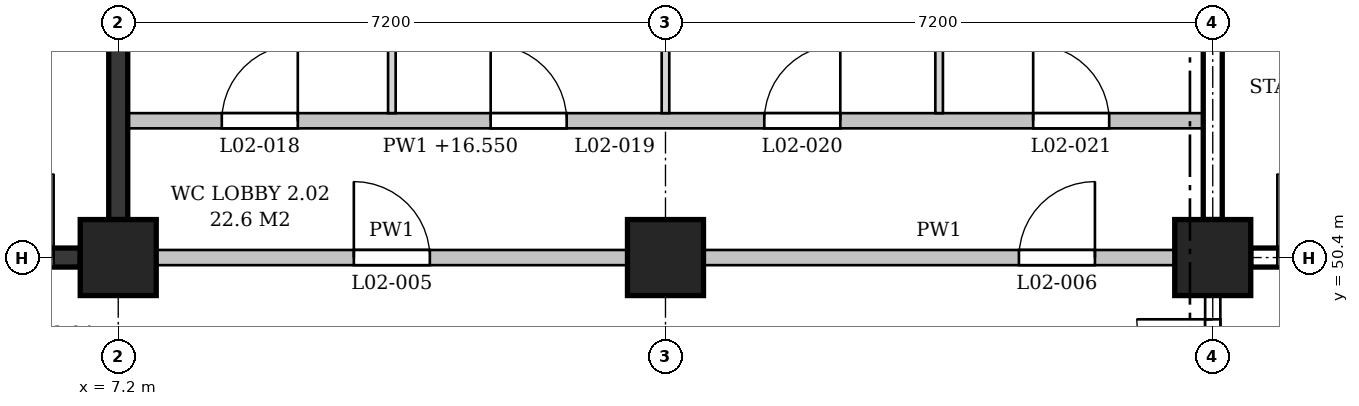
"""IFC4 building model, lengths in metres.
Left out: names, types, materials, properties, quantities, classifications, styles, units other than length and angle.
Written with IfcOpenShell. Run it as: python <this file> out.ifc"""

import sys

from ifc_helpers import new_model, si_unit, direction, frame, frame_2d, origin, origin_2d, place, context, subcontext, project, spatial, polyline, rectangle, outline, extrude, element, fill, save


model = new_model("IFC4")
c1 = context("Model", 3, precision=1e-05, world=origin(), true_north=direction((0.0, 1.0)))
c2 = subcontext(c1, "Body", "Model", "MODEL_VIEW")
j1 = project(units=[si_unit("LENGTHUNIT", "METRE"), si_unit("PLANEANGLEUNIT", "RADIAN")], contexts=[c1])
p1 = place(None, origin())
s1 = spatial("IfcSite", under=j1, at=p1, CompositionType="ELEMENT")
p2 = place(p1, origin())
s2 = spatial("IfcBuilding", under=s1, at=p2, CompositionType="ELEMENT")
p3 = place(p2, frame((0.0, 0.0, 11.4)))
s3 = spatial("IfcBuildingStorey", under=s2, at=p3, CompositionType="ELEMENT", Elevation=11.4)
for number, where, z_axis, x_axis in (
    (1, (7.2, 50.4, 0.0), (0.0, 0.0, 1.0), (1.0, 0.0, 0.0)),
    (2, (14.4, 50.4, 0.0), (0.0, 0.0, 1.0), (1.0, 0.0, 0.0)),
    (3, (21.6, 50.4, 0.0), (0.0, 0.0, 1.0), (1.0, 0.0, 0.0)),
):
    element("IfcColumn", number, at=place(p3, frame(where, z_axis=z_axis, x_axis=x_axis)), inside=s3, PredefinedType="COLUMN", context=c2, shape_type="SweptSolid", body=[
        extrude(rectangle(XDim=1.0, YDim=1.0, at=origin_2d()), origin(), (0.0, 0.0, 1.0), 5.4),
    ])
p4 = place(p3, frame((0.5, 50.4, 0.0), z_axis=(0.0, 0.0, 1.0), x_axis=(1.0, 0.0, 0.0)))
e4 = element("IfcWall", 4, at=p4, inside=s3, PredefinedType="SHEAR", context=c2, shape_type="SweptSolid", body=[
    extrude(rectangle(XDim=6.2, YDim=0.25, at=frame_2d((3.1, 0.0))), origin(), (0.0, 0.0, 1.0), 4.4),
])
p5 = place(p4, frame((4.75, 0.0, 0.0)))
e5 = element("IfcOpeningElement", 5, at=p5, cuts=e4, PredefinedType="OPENING", context=c2, shape_type="SweptSolid", body=[
    extrude(rectangle(XDim=1.1, YDim=2.1, at=frame_2d((0.55, 1.05))), frame((0.0, 0.135, 0.0), z_axis=(0.0, -1.0, 0.0), x_axis=(1.0, 0.0, 0.0)), (0.0, 0.0, 1.0), 0.27),
])
p6 = place(p3, frame((7.2, 50.9, 0.0), z_axis=(0.0, 0.0, 1.0), x_axis=(0.0, 1.0, 0.0)))
e6 = element("IfcWall", 6, at=p6, inside=s3, PredefinedType="SHEAR", context=c2, shape_type="SweptSolid", body=[
    extrude(rectangle(XDim=6.2, YDim=0.25, at=frame_2d((3.1, 0.0))), origin(), (0.0, 0.0, 1.0), 4.4),
])
p7 = place(p3, frame((22.1, 50.4, 0.0), z_axis=(0.0, 0.0, 1.0), x_axis=(1.0, 0.0, 0.0)))
e7 = element("IfcWall", 7, at=p7, inside=s3, PredefinedType="SHEAR", context=c2, shape_type="SweptSolid", body=[
    extrude(rectangle(XDim=6.2, YDim=0.25, at=frame_2d((3.1, 0.0))), origin(), (0.0, 0.0, 1.0), 4.4),
])
p8 = place(p7, frame((0.35, 0.0, 0.0)))
e8 = element("IfcOpeningElement", 8, at=p8, cuts=e7, PredefinedType="OPENING", context=c2, shape_type="SweptSolid", body=[
    extrude(rectangle(XDim=1.1, YDim=2.1, at=frame_2d((0.55, 1.05))), frame((0.0, 0.135, 0.0), z_axis=(0.0, -1.0, 0.0), x_axis=(1.0, 0.0, 0.0)), (0.0, 0.0, 1.0), 0.27),
])
p9 = place(p3, frame((21.6, 50.9, 0.0), z_axis=(0.0, 0.0, 1.0), x_axis=(0.0, 1.0, 0.0)))
e9 = element("IfcWall", 9, at=p9, inside=s3, PredefinedType="SHEAR", context=c2, shape_type="SweptSolid", body=[
    extrude(rectangle(XDim=6.2, YDim=0.25, at=frame_2d((3.1, 0.0))), origin(), (0.0, 0.0, 1.0), 4.4),
])
p10 = place(p3, frame((7.7, 50.4, 0.0), z_axis=(0.0, 0.0, 1.0), x_axis=(1.0, 0.0, 0.0)))
e10 = element("IfcWall", 10, at=p10, inside=s3, PredefinedType="PARTITIONING", context=c2, shape_type="SweptSolid", body=[
    extrude(rectangle(XDim=6.2, YDim=0.2, at=frame_2d((3.1, 0.0))), origin(), (0.0, 0.0, 1.0), 4.4),
])
p11 = place(p10, frame((2.6, 0.0, 0.0)))
e11 = element("IfcOpeningElement", 11, at=p11, cuts=e10, PredefinedType="OPENING", context=c2, shape_type="SweptSolid", body=[
    extrude(rectangle(XDim=1.0, YDim=2.1, at=frame_2d((0.5, 1.05))), frame((0.0, 0.11, 0.0), z_axis=(0.0, -1.0, 0.0), x_axis=(1.0, 0.0, 0.0)), (0.0, 0.0, 1.0), 0.22),
])
p12 = place(p3, frame((14.9, 50.4, 0.0), z_axis=(0.0, 0.0, 1.0), x_axis=(1.0, 0.0, 0.0)))
e12 = element("IfcWall", 12, at=p12, inside=s3, PredefinedType="PARTITIONING", context=c2, shape_type="SweptSolid", body=[
    extrude(rectangle(XDim=6.2, YDim=0.2, at=frame_2d((3.1, 0.0))), origin(), (0.0, 0.0, 1.0), 4.4),
])
p13 = place(p12, frame((4.15, 0.0, 0.0)))
e13 = element("IfcOpeningElement", 13, at=p13, cuts=e12, PredefinedType="OPENING", context=c2, shape_type="SweptSolid", body=[
    extrude(rectangle(XDim=1.0, YDim=2.1, at=frame_2d((0.5, 1.05))), frame((0.0, 0.11, 0.0), z_axis=(0.0, -1.0, 0.0), x_axis=(1.0, 0.0, 0.0)), (0.0, 0.0, 1.0), 0.22),
])
p14 = place(p3, frame((7.325, 52.2, 0.0), z_axis=(0.0, 0.0, 1.0), x_axis=(1.0, 0.0, 0.0)))
e14 = element("IfcWall", 14, at=p14, inside=s3, PredefinedType="PARTITIONING", context=c2, shape_type="SweptSolid", body=[
    extrude(outline(polyline([(0.0, 0.0), (14.15, 0.0), (14.15, 4.4), (14.025, 4.4), (14.025, 5.15), (7.325, 5.15), (7.325, 4.4), (6.825, 4.4), (6.825, 5.15), (0.125, 5.15), (0.125, 4.4), (0.0, 4.4), (0.0, 0.0)])), frame((0.0, 0.1, 0.0), z_axis=(0.0, -1.0, 0.0), x_axis=(1.0, 0.0, 0.0)), (0.0, 0.0, 1.0), 0.2),
])
p15 = place(p14, frame((1.238, 0.0, 0.0)))
e15 = element("IfcOpeningElement", 15, at=p15, cuts=e14, PredefinedType="OPENING", context=c2, shape_type="SweptSolid", body=[
    extrude(rectangle(XDim=1.0, YDim=2.1, at=frame_2d((0.5, 1.05))), frame((0.0, 0.11, 0.0), z_axis=(0.0, -1.0, 0.0), x_axis=(1.0, 0.0, 0.0)), (0.0, 0.0, 1.0), 0.22),
])
p16 = place(p14, frame((4.775, 0.0, 0.0)))
e16 = element("IfcOpeningElement", 16, at=p16, cuts=e14, PredefinedType="OPENING", context=c2, shape_type="SweptSolid", body=[
    extrude(rectangle(XDim=1.0, YDim=2.1, at=frame_2d((0.5, 1.05))), frame((0.0, 0.11, 0.0), z_axis=(0.0, -1.0, 0.0), x_axis=(1.0, 0.0, 0.0)), (0.0, 0.0, 1.0), 0.22),
])
p17 = place(p14, frame((8.375, 0.0, 0.0)))
e17 = element("IfcOpeningElement", 17, at=p17, cuts=e14, PredefinedType="OPENING", context=c2, shape_type="SweptSolid", body=[
    extrude(rectangle(XDim=1.0, YDim=2.1, at=frame_2d((0.5, 1.05))), frame((0.0, 0.11, 0.0), z_axis=(0.0, -1.0, 0.0), x_axis=(1.0, 0.0, 0.0)), (0.0, 0.0, 1.0), 0.22),
])
p18 = place(p14, frame((11.913, 0.0, 0.0)))
e18 = element("IfcOpeningElement", 18, at=p18, cuts=e14, PredefinedType="OPENING", context=c2, shape_type="SweptSolid", body=[
    extrude(rectangle(XDim=1.0, YDim=2.1, at=frame_2d((0.5, 1.05))), frame((0.0, 0.11, 0.0), z_axis=(0.0, -1.0, 0.0), x_axis=(1.0, 0.0, 0.0)), (0.0, 0.0, 1.0), 0.22),
])
p19 = place(p3, frame((10.8, 52.3, 0.0), z_axis=(0.0, 0.0, 1.0), x_axis=(0.0, 1.0, 0.0)))
e19 = element("IfcWall", 19, at=p19, inside=s3, PredefinedType="PARTITIONING", context=c2, shape_type="SweptSolid", body=[
    extrude(rectangle(XDim=5.15, YDim=0.1, at=frame_2d((2.575, 0.0))), origin(), (0.0, 0.0, 1.0), 4.4),
])
p20 = place(p3, frame((14.4, 52.3, 0.0), z_axis=(0.0, 0.0, 1.0), x_axis=(0.0, 1.0, 0.0)))
e20 = element("IfcWall", 20, at=p20, inside=s3, PredefinedType="PARTITIONING", context=c2, shape_type="SweptSolid", body=[
    extrude(rectangle(XDim=4.8, YDim=0.1, at=frame_2d((2.4, 0.0))), origin(), (0.0, 0.0, 1.0), 4.4),
])
p21 = place(p3, frame((18.0, 52.3, 0.0), z_axis=(0.0, 0.0, 1.0), x_axis=(0.0, 1.0, 0.0)))
e21 = element("IfcWall", 21, at=p21, inside=s3, PredefinedType="PARTITIONING", context=c2, shape_type="SweptSolid", body=[
    extrude(rectangle(XDim=5.15, YDim=0.1, at=frame_2d((2.575, 0.0))), origin(), (0.0, 0.0, 1.0), 4.4),
])
p22 = place(p3, frame((21.6, 47.275, 0.0), z_axis=(0.0, 0.0, 1.0), x_axis=(0.0, 1.0, 0.0)))
e22 = element("IfcWall", 22, at=p22, inside=s3, PredefinedType="PARTITIONING", context=c2, shape_type="SweptSolid", body=[
    extrude(rectangle(XDim=2.625, YDim=0.2, at=frame_2d((1.312, 0.0))), origin(), (0.0, 0.0, 1.0), 4.4),
])
p23 = place(p22, frame((0.312, 0.0, 0.0)))
e23 = element("IfcOpeningElement", 23, at=p23, cuts=e22, PredefinedType="OPENING", context=c2, shape_type="SweptSolid", body=[
    extrude(rectangle(XDim=2.0, YDim=2.4, at=frame_2d((1.0, 1.2))), frame((0.0, 0.11, 0.0), z_axis=(0.0, -1.0, 0.0), x_axis=(1.0, 0.0, 0.0)), (0.0, 0.0, 1.0), 0.22),
])
p24 = place(p5, origin())
e24 = element("IfcDoor", 24, at=p24, inside=s3, OperationType="SINGLE_SWING_RIGHT", PredefinedType="DOOR", context=c2, shape_type="SweptSolid", body=[
    extrude(rectangle(XDim=1.1, YDim=2.1, at=frame_2d((0.55, 1.05))), frame((0.0, 0.025, 0.0), z_axis=(0.0, -1.0, 0.0), x_axis=(1.0, 0.0, 0.0)), (0.0, 0.0, 1.0), 0.05),
])
fill(e5, e24)
p25 = place(p8, origin())
e25 = element("IfcDoor", 25, at=p25, inside=s3, OperationType="SINGLE_SWING_LEFT", PredefinedType="DOOR", context=c2, shape_type="SweptSolid", body=[
    extrude(rectangle(XDim=1.1, YDim=2.1, at=frame_2d((0.55, 1.05))), frame((0.0, 0.025, 0.0), z_axis=(0.0, -1.0, 0.0), x_axis=(1.0, 0.0, 0.0)), (0.0, 0.0, 1.0), 0.05),
])
fill(e8, e25)
p26 = place(p23, origin())
e26 = element("IfcDoor", 26, at=p26, inside=s3, OperationType="DOUBLE_DOOR_SINGLE_SWING", PredefinedType="DOOR", context=c2, shape_type="SweptSolid", body=[
    extrude(rectangle(XDim=2.0, YDim=2.4, at=frame_2d((1.0, 1.2))), frame((0.0, 0.025, 0.0), z_axis=(0.0, -1.0, 0.0), x_axis=(1.0, 0.0, 0.0)), (0.0, 0.0, 1.0), 0.05),
])
fill(e23, e26)
p27 = place(p11, origin())
e27 = element("IfcDoor", 27, at=p27, inside=s3, OperationType="SINGLE_SWING_LEFT", PredefinedType="DOOR", context=c2, shape_type="SweptSolid", body=[
    extrude(rectangle(XDim=1.0, YDim=2.1, at=frame_2d((0.5, 1.05))), frame((0.0, 0.025, 0.0), z_axis=(0.0, -1.0, 0.0), x_axis=(1.0, 0.0, 0.0)), (0.0, 0.0, 1.0), 0.05),
])
fill(e11, e27)
p28 = place(p13, origin())
e28 = element("IfcDoor", 28, at=p28, inside=s3, OperationType="SINGLE_SWING_RIGHT", PredefinedType="DOOR", context=c2, shape_type="SweptSolid", body=[
    extrude(rectangle(XDim=1.0, YDim=2.1, at=frame_2d((0.5, 1.05))), frame((0.0, 0.025, 0.0), z_axis=(0.0, -1.0, 0.0), x_axis=(1.0, 0.0, 0.0)), (0.0, 0.0, 1.0), 0.05),
])
fill(e13, e28)
p29 = place(p15, origin())
e29 = element("IfcDoor", 29, at=p29, inside=s3, OperationType="SINGLE_SWING_RIGHT", PredefinedType="DOOR", context=c2, shape_type="SweptSolid", body=[
    extrude(rectangle(XDim=1.0, YDim=2.1, at=frame_2d((0.5, 1.05))), frame((0.0, 0.025, 0.0), z_axis=(0.0, -1.0, 0.0), x_axis=(1.0, 0.0, 0.0)), (0.0, 0.0, 1.0), 0.05),
])
fill(e15, e29)
p30 = place(p16, origin())
e30 = element("IfcDoor", 30, at=p30, inside=s3, OperationType="SINGLE_SWING_LEFT", PredefinedType="DOOR", context=c2, shape_type="SweptSolid", body=[
    extrude(rectangle(XDim=1.0, YDim=2.1, at=frame_2d((0.5, 1.05))), frame((0.0, 0.025, 0.0), z_axis=(0.0, -1.0, 0.0), x_axis=(1.0, 0.0, 0.0)), (0.0, 0.0, 1.0), 0.05),
])
fill(e16, e30)
p31 = place(p17, origin())
e31 = element("IfcDoor", 31, at=p31, inside=s3, OperationType="SINGLE_SWING_RIGHT", PredefinedType="DOOR", context=c2, shape_type="SweptSolid", body=[
    extrude(rectangle(XDim=1.0, YDim=2.1, at=frame_2d((0.5, 1.05))), frame((0.0, 0.025, 0.0), z_axis=(0.0, -1.0, 0.0), x_axis=(1.0, 0.0, 0.0)), (0.0, 0.0, 1.0), 0.05),
])
fill(e17, e31)
p32 = place(p18, origin())
e32 = element("IfcDoor", 32, at=p32, inside=s3, OperationType="SINGLE_SWING_LEFT", PredefinedType="DOOR", context=c2, shape_type="SweptSolid", body=[
    extrude(rectangle(XDim=1.0, YDim=2.1, at=frame_2d((0.5, 1.05))), frame((0.0, 0.025, 0.0), z_axis=(0.0, -1.0, 0.0), x_axis=(1.0, 0.0, 0.0)), (0.0, 0.0, 1.0), 0.05),
])
fill(e18, e32)
save(model, sys.argv[1])
